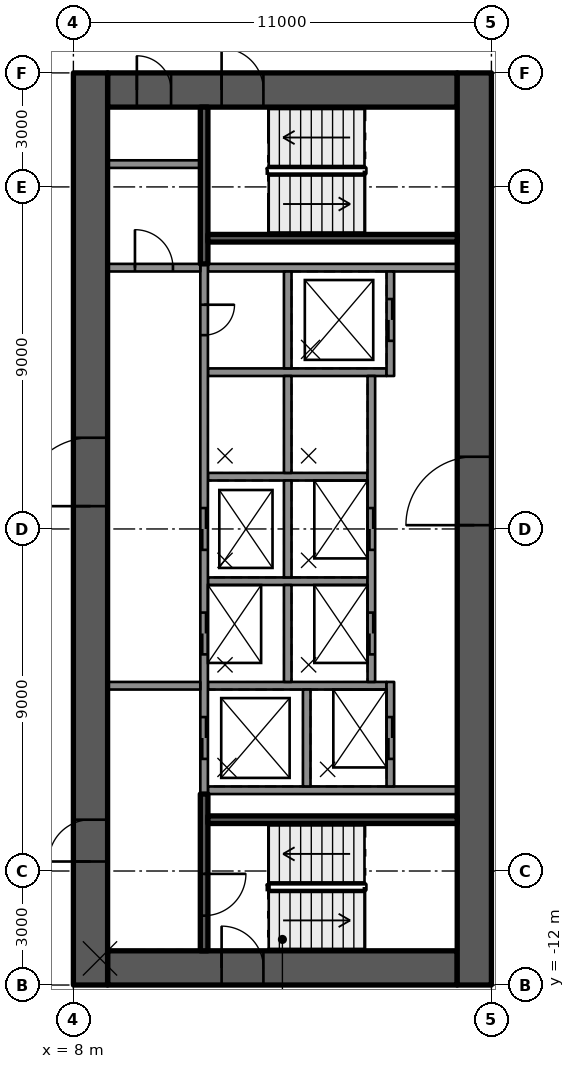
"""IFC4 building model, lengths in metres.
Left out: names, types, materials, properties, quantities, classifications, styles, units other than length and angle.
Written with IfcOpenShell. Run it as: python <this file> out.ifc"""

import sys

from ifc_helpers import new_model, si_unit, direction, frame, frame_2d, origin, place, context, subcontext, project, spatial, rectangle, extrude, element, fill, save


model = new_model("IFC4")
c1 = context("Model", 3, precision=1e-05, world=origin(), true_north=direction((0.0, 1.0)))
c2 = subcontext(c1, "Body", "Model", "MODEL_VIEW")
j1 = project(units=[si_unit("LENGTHUNIT", "METRE"), si_unit("PLANEANGLEUNIT", "RADIAN")], contexts=[c1])
p1 = place(None, origin())
s1 = spatial("IfcSite", under=j1, at=p1, CompositionType="ELEMENT")
p2 = place(p1, origin())
s2 = spatial("IfcBuilding", under=s1, at=p2, CompositionType="ELEMENT")
p3 = place(p2, frame((0.0, 0.0, 51.3)))
s3 = spatial("IfcBuildingStorey", under=s2, at=p3, CompositionType="ELEMENT", Elevation=51.3)
p4 = place(p3, frame((8.9, 11.55, 0.0), z_axis=(0.0, 0.0, 1.0), x_axis=(1.0, 0.0, 0.0)))
e1 = element("IfcWall", 1, at=p4, inside=s3, PredefinedType="SHEAR", context=c2, shape_type="SweptSolid", body=[
    extrude(rectangle(XDim=9.2, YDim=0.9, at=frame_2d((4.6, 0.0))), origin(), (0.0, 0.0, 1.0), 3.5),
])
p5 = place(p4, frame((3.0, 0.0, 0.0)))
e2 = element("IfcOpeningElement", 2, at=p5, cuts=e1, PredefinedType="OPENING", context=c2, shape_type="SweptSolid", body=[
    extrude(rectangle(XDim=1.1, YDim=2.1, at=frame_2d((0.55, 1.05))), frame((0.0, 0.46, 0.0), z_axis=(0.0, -1.0, 0.0), x_axis=(1.0, 0.0, 0.0)), (0.0, 0.0, 1.0), 0.92),
])
p6 = place(p4, frame((0.77, 0.0, 0.0)))
e3 = element("IfcOpeningElement", 3, at=p6, cuts=e1, PredefinedType="OPENING", context=c2, shape_type="SweptSolid", body=[
    extrude(rectangle(XDim=0.9, YDim=2.1, at=frame_2d((0.45, 1.05))), frame((0.0, 0.46, 0.0), z_axis=(0.0, -1.0, 0.0), x_axis=(1.0, 0.0, 0.0)), (0.0, 0.0, 1.0), 0.92),
])
p7 = place(p3, frame((8.9, -11.55, 0.0), z_axis=(0.0, 0.0, 1.0), x_axis=(1.0, 0.0, 0.0)))
e4 = element("IfcWall", 4, at=p7, inside=s3, PredefinedType="SHEAR", context=c2, shape_type="SweptSolid", body=[
    extrude(rectangle(XDim=9.2, YDim=0.9, at=frame_2d((4.6, 0.0))), origin(), (0.0, 0.0, 1.0), 3.5),
])
p8 = place(p7, frame((3.0, 0.0, 0.0)))
e5 = element("IfcOpeningElement", 5, at=p8, cuts=e4, PredefinedType="OPENING", context=c2, shape_type="SweptSolid", body=[
    extrude(rectangle(XDim=1.1, YDim=2.1, at=frame_2d((0.55, 1.05))), frame((0.0, 0.46, 0.0), z_axis=(0.0, -1.0, 0.0), x_axis=(1.0, 0.0, 0.0)), (0.0, 0.0, 1.0), 0.92),
])
p9 = place(p3, frame((8.45, -12.0, 0.0), z_axis=(0.0, 0.0, 1.0), x_axis=(0.0, 1.0, 0.0)))
e6 = element("IfcWall", 6, at=p9, inside=s3, PredefinedType="SHEAR", context=c2, shape_type="SweptSolid", body=[
    extrude(rectangle(XDim=24.0, YDim=0.9, at=frame_2d((12.0, 0.0))), origin(), (0.0, 0.0, 1.0), 3.5),
])
p10 = place(p9, frame((12.6, 0.0, 0.0)))
e7 = element("IfcOpeningElement", 7, at=p10, cuts=e6, PredefinedType="OPENING", context=c2, shape_type="SweptSolid", body=[
    extrude(rectangle(XDim=1.8, YDim=2.1, at=frame_2d((0.9, 1.05))), frame((0.0, 0.46, 0.0), z_axis=(0.0, -1.0, 0.0), x_axis=(1.0, 0.0, 0.0)), (0.0, 0.0, 1.0), 0.92),
])
p11 = place(p9, frame((3.25, 0.0, 0.0)))
e8 = element("IfcOpeningElement", 8, at=p11, cuts=e6, PredefinedType="OPENING", context=c2, shape_type="SweptSolid", body=[
    extrude(rectangle(XDim=1.1, YDim=2.1, at=frame_2d((0.55, 1.05))), frame((0.0, 0.46, 0.0), z_axis=(0.0, -1.0, 0.0), x_axis=(1.0, 0.0, 0.0)), (0.0, 0.0, 1.0), 0.92),
])
p12 = place(p3, frame((18.55, -12.0, 0.0), z_axis=(0.0, 0.0, 1.0), x_axis=(0.0, 1.0, 0.0)))
e9 = element("IfcWall", 9, at=p12, inside=s3, PredefinedType="SHEAR", context=c2, shape_type="SweptSolid", body=[
    extrude(rectangle(XDim=24.0, YDim=0.9, at=frame_2d((12.0, 0.0))), origin(), (0.0, 0.0, 1.0), 3.5),
])
p13 = place(p12, frame((12.1, 0.0, 0.0)))
e10 = element("IfcOpeningElement", 10, at=p13, cuts=e9, PredefinedType="OPENING", context=c2, shape_type="SweptSolid", body=[
    extrude(rectangle(XDim=1.8, YDim=2.1, at=frame_2d((0.9, 1.05))), frame((0.0, 0.46, 0.0), z_axis=(0.0, -1.0, 0.0), x_axis=(1.0, 0.0, 0.0)), (0.0, 0.0, 1.0), 0.92),
])
for number, where, z_axis, x_axis in (
    (11, (11.54, -6.875, 0.0), (0.0, 0.0, 1.0), (1.0, 0.0, 0.0)),
    (12, (11.54, 6.875, 0.0), (0.0, 0.0, 1.0), (1.0, 0.0, 0.0)),
):
    element("IfcWall", number, at=place(p3, frame(where, z_axis=z_axis, x_axis=x_axis)), inside=s3, PredefinedType="SOLIDWALL", context=c2, shape_type="SweptSolid", body=[
        extrude(rectangle(XDim=6.56, YDim=0.2, at=frame_2d((3.28, 0.0))), origin(), (0.0, 0.0, 1.0), 3.09),
    ])
p14 = place(p3, frame((11.54, 4.125, 0.0), z_axis=(0.0, 0.0, 1.0), x_axis=(1.0, 0.0, 0.0)))
e13 = element("IfcWall", 13, at=p14, inside=s3, PredefinedType="SOLIDWALL", context=c2, shape_type="SweptSolid", body=[
    extrude(rectangle(XDim=4.7, YDim=0.2, at=frame_2d((2.35, 0.0))), origin(), (0.0, 0.0, 1.0), 3.09),
])
for number, where, z_axis, x_axis in (
    (14, (11.54, 1.375, 0.0), (0.0, 0.0, 1.0), (1.0, 0.0, 0.0)),
    (15, (11.54, -1.375, 0.0), (0.0, 0.0, 1.0), (1.0, 0.0, 0.0)),
):
    element("IfcWall", number, at=place(p3, frame(where, z_axis=z_axis, x_axis=x_axis)), inside=s3, PredefinedType="SOLIDWALL", context=c2, shape_type="SweptSolid", body=[
        extrude(rectangle(XDim=4.2, YDim=0.2, at=frame_2d((2.1, 0.0))), origin(), (0.0, 0.0, 1.0), 3.09),
    ])
p15 = place(p3, frame((11.54, -4.125, 0.0), z_axis=(0.0, 0.0, 1.0), x_axis=(1.0, 0.0, 0.0)))
e16 = element("IfcWall", 16, at=p15, inside=s3, PredefinedType="SOLIDWALL", context=c2, shape_type="SweptSolid", body=[
    extrude(rectangle(XDim=4.7, YDim=0.2, at=frame_2d((2.35, 0.0))), origin(), (0.0, 0.0, 1.0), 3.09),
])
p16 = place(p3, frame((11.44, 6.975, 0.0), z_axis=(0.0, 0.0, 1.0), x_axis=(0.0, -1.0, 0.0)))
e17 = element("IfcWall", 17, at=p16, inside=s3, PredefinedType="SOLIDWALL", context=c2, shape_type="SweptSolid", body=[
    extrude(rectangle(XDim=13.95, YDim=0.2, at=frame_2d((6.975, 0.0))), origin(), (0.0, 0.0, 1.0), 3.09),
])
p17 = place(p16, frame((6.425, 0.0, 0.0)))
e18 = element("IfcOpeningElement", 18, at=p17, cuts=e17, PredefinedType="OPENING", context=c2, shape_type="SweptSolid", body=[
    extrude(rectangle(XDim=1.1, YDim=2.1, at=frame_2d((0.55, 1.05))), frame((0.0, 0.11, 0.0), z_axis=(0.0, -1.0, 0.0), x_axis=(1.0, 0.0, 0.0)), (0.0, 0.0, 1.0), 0.22),
])
p18 = place(p16, frame((9.175, 0.0, 0.0)))
e19 = element("IfcOpeningElement", 19, at=p18, cuts=e17, PredefinedType="OPENING", context=c2, shape_type="SweptSolid", body=[
    extrude(rectangle(XDim=1.1, YDim=2.1, at=frame_2d((0.55, 1.05))), frame((0.0, 0.11, 0.0), z_axis=(0.0, -1.0, 0.0), x_axis=(1.0, 0.0, 0.0)), (0.0, 0.0, 1.0), 0.22),
])
p19 = place(p16, frame((11.925, 0.0, 0.0)))
e20 = element("IfcOpeningElement", 20, at=p19, cuts=e17, PredefinedType="OPENING", context=c2, shape_type="SweptSolid", body=[
    extrude(rectangle(XDim=1.1, YDim=2.1, at=frame_2d((0.55, 1.05))), frame((0.0, 0.11, 0.0), z_axis=(0.0, -1.0, 0.0), x_axis=(1.0, 0.0, 0.0)), (0.0, 0.0, 1.0), 0.22),
])
p20 = place(p16, frame((1.075, 0.0, 0.0)))
e21 = element("IfcOpeningElement", 21, at=p20, cuts=e17, PredefinedType="OPENING", context=c2, shape_type="SweptSolid", body=[
    extrude(rectangle(XDim=0.8, YDim=2.1, at=frame_2d((0.4, 1.05))), frame((0.0, 0.11, 0.0), z_axis=(0.0, -1.0, 0.0), x_axis=(1.0, 0.0, 0.0)), (0.0, 0.0, 1.0), 0.22),
])
for number, where, z_axis, x_axis in (
    (22, (13.64, 6.775, 0.0), (0.0, 0.0, 1.0), (0.0, -1.0, 0.0)),
    (23, (13.64, 4.025, 0.0), (0.0, 0.0, 1.0), (0.0, -1.0, 0.0)),
    (24, (13.64, 1.275, 0.0), (0.0, 0.0, 1.0), (0.0, -1.0, 0.0)),
    (25, (13.64, -1.475, 0.0), (0.0, 0.0, 1.0), (0.0, -1.0, 0.0)),
    (26, (14.14, -4.225, 0.0), (0.0, 0.0, 1.0), (0.0, -1.0, 0.0)),
):
    element("IfcWall", number, at=place(p3, frame(where, z_axis=z_axis, x_axis=x_axis)), inside=s3, PredefinedType="SOLIDWALL", context=c2, shape_type="SweptSolid", body=[
        extrude(rectangle(XDim=2.55, YDim=0.2, at=frame_2d((1.275, 0.0))), origin(), (0.0, 0.0, 1.0), 3.09),
    ])
p21 = place(p3, frame((16.34, 6.775, 0.0), z_axis=(0.0, 0.0, 1.0), x_axis=(0.0, -1.0, 0.0)))
e27 = element("IfcWall", 27, at=p21, inside=s3, PredefinedType="SOLIDWALL", context=c2, shape_type="SweptSolid", body=[
    extrude(rectangle(XDim=2.75, YDim=0.2, at=frame_2d((1.375, 0.0))), origin(), (0.0, 0.0, 1.0), 3.09),
])
p22 = place(p21, frame((0.725, 0.0, 0.0)))
e28 = element("IfcOpeningElement", 28, at=p22, cuts=e27, PredefinedType="OPENING", context=c2, shape_type="SweptSolid", body=[
    extrude(rectangle(XDim=1.1, YDim=2.1, at=frame_2d((0.55, 1.05))), frame((0.0, 0.11, 0.0), z_axis=(0.0, -1.0, 0.0), x_axis=(1.0, 0.0, 0.0)), (0.0, 0.0, 1.0), 0.22),
])
p23 = place(p3, frame((15.84, 4.025, 0.0), z_axis=(0.0, 0.0, 1.0), x_axis=(0.0, -1.0, 0.0)))
e29 = element("IfcWall", 29, at=p23, inside=s3, PredefinedType="SOLIDWALL", context=c2, shape_type="SweptSolid", body=[
    extrude(rectangle(XDim=8.05, YDim=0.2, at=frame_2d((4.025, 0.0))), origin(), (0.0, 0.0, 1.0), 3.09),
])
p24 = place(p23, frame((3.475, 0.0, 0.0)))
e30 = element("IfcOpeningElement", 30, at=p24, cuts=e29, PredefinedType="OPENING", context=c2, shape_type="SweptSolid", body=[
    extrude(rectangle(XDim=1.1, YDim=2.1, at=frame_2d((0.55, 1.05))), frame((0.0, 0.11, 0.0), z_axis=(0.0, -1.0, 0.0), x_axis=(1.0, 0.0, 0.0)), (0.0, 0.0, 1.0), 0.22),
])
p25 = place(p23, frame((6.225, 0.0, 0.0)))
e31 = element("IfcOpeningElement", 31, at=p25, cuts=e29, PredefinedType="OPENING", context=c2, shape_type="SweptSolid", body=[
    extrude(rectangle(XDim=1.1, YDim=2.1, at=frame_2d((0.55, 1.05))), frame((0.0, 0.11, 0.0), z_axis=(0.0, -1.0, 0.0), x_axis=(1.0, 0.0, 0.0)), (0.0, 0.0, 1.0), 0.22),
])
p26 = place(p3, frame((16.34, -4.025, 0.0), z_axis=(0.0, 0.0, 1.0), x_axis=(0.0, -1.0, 0.0)))
e32 = element("IfcWall", 32, at=p26, inside=s3, PredefinedType="SOLIDWALL", context=c2, shape_type="SweptSolid", body=[
    extrude(rectangle(XDim=2.75, YDim=0.2, at=frame_2d((1.375, 0.0))), origin(), (0.0, 0.0, 1.0), 3.09),
])
p27 = place(p26, frame((0.925, 0.0, 0.0)))
e33 = element("IfcOpeningElement", 33, at=p27, cuts=e32, PredefinedType="OPENING", context=c2, shape_type="SweptSolid", body=[
    extrude(rectangle(XDim=1.1, YDim=2.1, at=frame_2d((0.55, 1.05))), frame((0.0, 0.11, 0.0), z_axis=(0.0, -1.0, 0.0), x_axis=(1.0, 0.0, 0.0)), (0.0, 0.0, 1.0), 0.22),
])
p28 = place(p3, frame((11.44, -6.975, 0.0), z_axis=(0.0, 0.0, 1.0), x_axis=(0.0, -1.0, 0.0)))
e34 = element("IfcWall", 34, at=p28, inside=s3, PredefinedType="SOLIDWALL", context=c2, shape_type="SweptSolid", body=[
    extrude(rectangle(XDim=4.125, YDim=0.2, at=frame_2d((2.062, 0.0))), origin(), (0.0, 0.0, 1.0), 3.09),
])
p29 = place(p28, frame((2.1, 0.0, 0.0)))
e35 = element("IfcOpeningElement", 35, at=p29, cuts=e34, PredefinedType="OPENING", context=c2, shape_type="SweptSolid", body=[
    extrude(rectangle(XDim=1.1, YDim=2.1, at=frame_2d((0.55, 1.05))), frame((0.0, 0.11, 0.0), z_axis=(0.0, -1.0, 0.0), x_axis=(1.0, 0.0, 0.0)), (0.0, 0.0, 1.0), 0.22),
])
p30 = place(p3, frame((11.54, -7.65, 0.0), z_axis=(0.0, 0.0, 1.0), x_axis=(1.0, 0.0, 0.0)))
e36 = element("IfcWall", 36, at=p30, inside=s3, PredefinedType="SOLIDWALL", context=c2, shape_type="SweptSolid", body=[
    extrude(rectangle(XDim=6.56, YDim=0.2, at=frame_2d((3.28, 0.0))), origin(), (0.0, 0.0, 1.0), 3.09),
])
p31 = place(p3, frame((11.44, 11.1, 0.0), z_axis=(0.0, 0.0, 1.0), x_axis=(0.0, -1.0, 0.0)))
e37 = element("IfcWall", 37, at=p31, inside=s3, PredefinedType="SOLIDWALL", context=c2, shape_type="SweptSolid", body=[
    extrude(rectangle(XDim=4.125, YDim=0.2, at=frame_2d((2.062, 0.0))), origin(), (0.0, 0.0, 1.0), 3.09),
])
p32 = place(p3, frame((11.54, 7.65, 0.0), z_axis=(0.0, 0.0, 1.0), x_axis=(1.0, 0.0, 0.0)))
e38 = element("IfcWall", 38, at=p32, inside=s3, PredefinedType="SOLIDWALL", context=c2, shape_type="SweptSolid", body=[
    extrude(rectangle(XDim=6.56, YDim=0.2, at=frame_2d((3.28, 0.0))), origin(), (0.0, 0.0, 1.0), 3.09),
])
p33 = place(p3, frame((8.9, -4.125, 0.0), z_axis=(0.0, 0.0, 1.0), x_axis=(1.0, 0.0, 0.0)))
e39 = element("IfcWall", 39, at=p33, inside=s3, PredefinedType="PARTITIONING", context=c2, shape_type="SweptSolid", body=[
    extrude(rectangle(XDim=2.44, YDim=0.2, at=frame_2d((1.22, 0.0))), origin(), (0.0, 0.0, 1.0), 3.09),
])
p34 = place(p3, frame((8.9, 6.875, 0.0), z_axis=(0.0, 0.0, 1.0), x_axis=(1.0, 0.0, 0.0)))
e40 = element("IfcWall", 40, at=p34, inside=s3, PredefinedType="PARTITIONING", context=c2, shape_type="SweptSolid", body=[
    extrude(rectangle(XDim=2.44, YDim=0.2, at=frame_2d((1.22, 0.0))), origin(), (0.0, 0.0, 1.0), 3.09),
])
p35 = place(p34, frame((0.72, 0.0, 0.0)))
e41 = element("IfcOpeningElement", 41, at=p35, cuts=e40, PredefinedType="OPENING", context=c2, shape_type="SweptSolid", body=[
    extrude(rectangle(XDim=1.0, YDim=2.1, at=frame_2d((0.5, 1.05))), frame((0.0, 0.11, 0.0), z_axis=(0.0, -1.0, 0.0), x_axis=(1.0, 0.0, 0.0)), (0.0, 0.0, 1.0), 0.22),
])
p36 = place(p3, frame((8.9, 9.6, 0.0), z_axis=(0.0, 0.0, 1.0), x_axis=(1.0, 0.0, 0.0)))
e42 = element("IfcWall", 42, at=p36, inside=s3, PredefinedType="PARTITIONING", context=c2, shape_type="SweptSolid", body=[
    extrude(rectangle(XDim=2.44, YDim=0.2, at=frame_2d((1.22, 0.0))), origin(), (0.0, 0.0, 1.0), 3.09),
])
p37 = place(p22, origin())
e43 = element("IfcDoor", 43, at=p37, inside=s3, OperationType="DOUBLE_DOOR_SLIDING", PredefinedType="DOOR", context=c2, shape_type="SweptSolid", body=[
    extrude(rectangle(XDim=1.1, YDim=2.1, at=frame_2d((0.55, 1.05))), frame((0.0, 0.025, 0.0), z_axis=(0.0, -1.0, 0.0), x_axis=(1.0, 0.0, 0.0)), (0.0, 0.0, 1.0), 0.05),
])
fill(e28, e43)
p38 = place(p17, origin())
e44 = element("IfcDoor", 44, at=p38, inside=s3, OperationType="DOUBLE_DOOR_SLIDING", PredefinedType="DOOR", context=c2, shape_type="SweptSolid", body=[
    extrude(rectangle(XDim=1.1, YDim=2.1, at=frame_2d((0.55, 1.05))), frame((0.0, 0.025, 0.0), z_axis=(0.0, -1.0, 0.0), x_axis=(1.0, 0.0, 0.0)), (0.0, 0.0, 1.0), 0.05),
])
fill(e18, e44)
p39 = place(p24, origin())
e45 = element("IfcDoor", 45, at=p39, inside=s3, OperationType="DOUBLE_DOOR_SLIDING", PredefinedType="DOOR", context=c2, shape_type="SweptSolid", body=[
    extrude(rectangle(XDim=1.1, YDim=2.1, at=frame_2d((0.55, 1.05))), frame((0.0, 0.025, 0.0), z_axis=(0.0, -1.0, 0.0), x_axis=(1.0, 0.0, 0.0)), (0.0, 0.0, 1.0), 0.05),
])
fill(e30, e45)
p40 = place(p18, origin())
e46 = element("IfcDoor", 46, at=p40, inside=s3, OperationType="DOUBLE_DOOR_SLIDING", PredefinedType="DOOR", context=c2, shape_type="SweptSolid", body=[
    extrude(rectangle(XDim=1.1, YDim=2.1, at=frame_2d((0.55, 1.05))), frame((0.0, 0.025, 0.0), z_axis=(0.0, -1.0, 0.0), x_axis=(1.0, 0.0, 0.0)), (0.0, 0.0, 1.0), 0.05),
])
fill(e19, e46)
p41 = place(p25, origin())
e47 = element("IfcDoor", 47, at=p41, inside=s3, OperationType="DOUBLE_DOOR_SLIDING", PredefinedType="DOOR", context=c2, shape_type="SweptSolid", body=[
    extrude(rectangle(XDim=1.1, YDim=2.1, at=frame_2d((0.55, 1.05))), frame((0.0, 0.025, 0.0), z_axis=(0.0, -1.0, 0.0), x_axis=(1.0, 0.0, 0.0)), (0.0, 0.0, 1.0), 0.05),
])
fill(e31, e47)
p42 = place(p19, origin())
e48 = element("IfcDoor", 48, at=p42, inside=s3, OperationType="DOUBLE_DOOR_SLIDING", PredefinedType="DOOR", context=c2, shape_type="SweptSolid", body=[
    extrude(rectangle(XDim=1.1, YDim=2.1, at=frame_2d((0.55, 1.05))), frame((0.0, 0.025, 0.0), z_axis=(0.0, -1.0, 0.0), x_axis=(1.0, 0.0, 0.0)), (0.0, 0.0, 1.0), 0.05),
])
fill(e20, e48)
p43 = place(p27, origin())
e49 = element("IfcDoor", 49, at=p43, inside=s3, OperationType="DOUBLE_DOOR_SLIDING", PredefinedType="DOOR", context=c2, shape_type="SweptSolid", body=[
    extrude(rectangle(XDim=1.1, YDim=2.1, at=frame_2d((0.55, 1.05))), frame((0.0, 0.025, 0.0), z_axis=(0.0, -1.0, 0.0), x_axis=(1.0, 0.0, 0.0)), (0.0, 0.0, 1.0), 0.05),
])
fill(e33, e49)
p44 = place(p20, origin())
e50 = element("IfcDoor", 50, at=p44, inside=s3, OperationType="SINGLE_SWING_LEFT", PredefinedType="DOOR", context=c2, shape_type="SweptSolid", body=[
    extrude(rectangle(XDim=0.8, YDim=2.1, at=frame_2d((0.4, 1.05))), frame((0.0, 0.025, 0.0), z_axis=(0.0, -1.0, 0.0), x_axis=(1.0, 0.0, 0.0)), (0.0, 0.0, 1.0), 0.05),
])
fill(e21, e50)
p45 = place(p10, origin())
e51 = element("IfcDoor", 51, at=p45, inside=s3, OperationType="SINGLE_SWING_RIGHT", PredefinedType="DOOR", context=c2, shape_type="SweptSolid", body=[
    extrude(rectangle(XDim=1.8, YDim=2.1, at=frame_2d((0.9, 1.05))), frame((0.0, 0.025, 0.0), z_axis=(0.0, -1.0, 0.0), x_axis=(1.0, 0.0, 0.0)), (0.0, 0.0, 1.0), 0.05),
])
fill(e7, e51)
p46 = place(p13, origin())
e52 = element("IfcDoor", 52, at=p46, inside=s3, OperationType="SINGLE_SWING_RIGHT", PredefinedType="DOOR", context=c2, shape_type="SweptSolid", body=[
    extrude(rectangle(XDim=1.8, YDim=2.1, at=frame_2d((0.9, 1.05))), frame((0.0, 0.025, 0.0), z_axis=(0.0, -1.0, 0.0), x_axis=(1.0, 0.0, 0.0)), (0.0, 0.0, 1.0), 0.05),
])
fill(e10, e52)
p47 = place(p11, origin())
e53 = element("IfcDoor", 53, at=p47, inside=s3, OperationType="SINGLE_SWING_LEFT", PredefinedType="DOOR", context=c2, shape_type="SweptSolid", body=[
    extrude(rectangle(XDim=1.1, YDim=2.1, at=frame_2d((0.55, 1.05))), frame((0.0, 0.025, 0.0), z_axis=(0.0, -1.0, 0.0), x_axis=(1.0, 0.0, 0.0)), (0.0, 0.0, 1.0), 0.05),
])
fill(e8, e53)
p48 = place(p8, origin())
e54 = element("IfcDoor", 54, at=p48, inside=s3, OperationType="SINGLE_SWING_LEFT", PredefinedType="DOOR", context=c2, shape_type="SweptSolid", body=[
    extrude(rectangle(XDim=1.1, YDim=2.1, at=frame_2d((0.55, 1.05))), frame((0.0, 0.025, 0.0), z_axis=(0.0, -1.0, 0.0), x_axis=(1.0, 0.0, 0.0)), (0.0, 0.0, 1.0), 0.05),
])
fill(e5, e54)
p49 = place(p5, origin())
e55 = element("IfcDoor", 55, at=p49, inside=s3, OperationType="SINGLE_SWING_LEFT", PredefinedType="DOOR", context=c2, shape_type="SweptSolid", body=[
    extrude(rectangle(XDim=1.1, YDim=2.1, at=frame_2d((0.55, 1.05))), frame((0.0, 0.025, 0.0), z_axis=(0.0, -1.0, 0.0), x_axis=(1.0, 0.0, 0.0)), (0.0, 0.0, 1.0), 0.05),
])
fill(e2, e55)
p50 = place(p29, origin())
e56 = element("IfcDoor", 56, at=p50, inside=s3, OperationType="SINGLE_SWING_RIGHT", PredefinedType="DOOR", context=c2, shape_type="SweptSolid", body=[
    extrude(rectangle(XDim=1.1, YDim=2.1, at=frame_2d((0.55, 1.05))), frame((0.0, 0.025, 0.0), z_axis=(0.0, -1.0, 0.0), x_axis=(1.0, 0.0, 0.0)), (0.0, 0.0, 1.0), 0.05),
])
fill(e35, e56)
p51 = place(p6, origin())
e57 = element("IfcDoor", 57, at=p51, inside=s3, OperationType="SINGLE_SWING_LEFT", PredefinedType="DOOR", context=c2, shape_type="SweptSolid", body=[
    extrude(rectangle(XDim=0.9, YDim=2.1, at=frame_2d((0.45, 1.05))), frame((0.0, 0.025, 0.0), z_axis=(0.0, -1.0, 0.0), x_axis=(1.0, 0.0, 0.0)), (0.0, 0.0, 1.0), 0.05),
])
fill(e3, e57)
p52 = place(p35, origin())
e58 = element("IfcDoor", 58, at=p52, inside=s3, OperationType="SINGLE_SWING_RIGHT", PredefinedType="DOOR", context=c2, shape_type="SweptSolid", body=[
    extrude(rectangle(XDim=1.0, YDim=2.1, at=frame_2d((0.5, 1.05))), frame((0.0, 0.025, 0.0), z_axis=(0.0, -1.0, 0.0), x_axis=(1.0, 0.0, 0.0)), (0.0, 0.0, 1.0), 0.05),
])
fill(e41, e58)
save(model, sys.argv[1])
